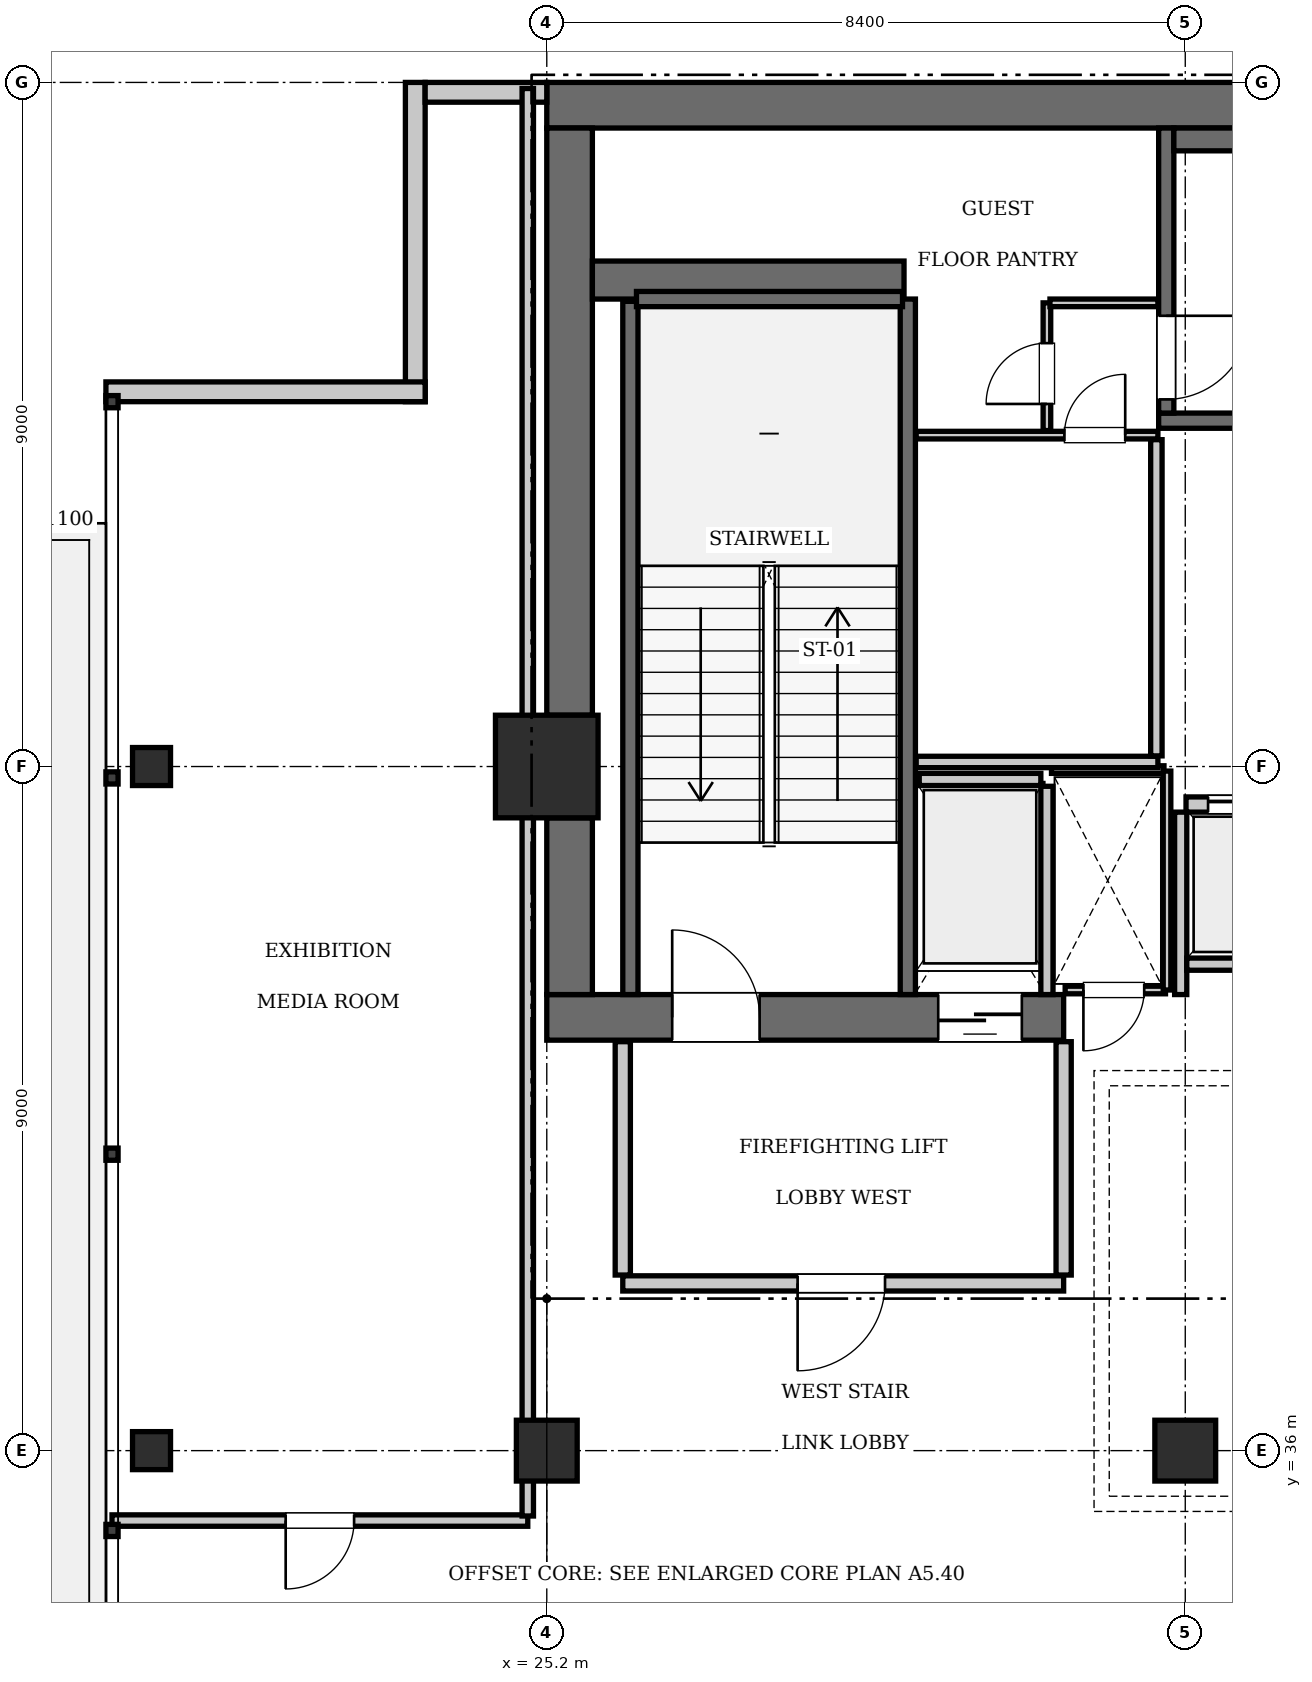
"""IFC4 building model, lengths in metres.
Left out: names, types, materials, properties, quantities, classifications, styles, units other than length and angle.
Written with IfcOpenShell. Run it as: python <this file> out.ifc"""

import sys

from ifc_helpers import new_model, si_unit, direction, frame, frame_2d, origin, origin_2d, place, context, subcontext, project, spatial, rectangle, i_section, extrude, element, fill, save


model = new_model("IFC4")
c1 = context("Model", 3, precision=1e-05, world=origin(), true_north=direction((0.0, 1.0)))
c2 = subcontext(c1, "Body", "Model", "MODEL_VIEW")
j1 = project(units=[si_unit("LENGTHUNIT", "METRE"), si_unit("PLANEANGLEUNIT", "RADIAN")], contexts=[c1])
p1 = place(None, origin())
s1 = spatial("IfcSite", under=j1, at=p1, CompositionType="ELEMENT")
p2 = place(p1, origin())
s2 = spatial("IfcBuilding", under=s1, at=p2, CompositionType="ELEMENT")
p3 = place(p2, frame((0.0, 0.0, 354.2)))
s3 = spatial("IfcBuildingStorey", under=s2, at=p3, CompositionType="ELEMENT", Elevation=354.2)
p4 = place(p3, frame((25.2, 45.0, 0.0), z_axis=(0.0, 0.0, 1.0), x_axis=(1.0, 0.0, 0.0)))
e1 = element("IfcColumn", 1, at=p4, inside=s3, PredefinedType="COLUMN", context=c2, shape_type="SweptSolid", body=[
    extrude(rectangle(XDim=1.35, YDim=1.35, at=origin_2d()), origin(), (0.0, 0.0, 1.0), 4.9),
])
p5 = place(p3, frame((25.2, 53.7, 0.0), z_axis=(0.0, 0.0, 1.0), x_axis=(1.0, 0.0, 0.0)))
e2 = element("IfcWall", 2, at=p5, inside=s3, PredefinedType="SHEAR", context=c2, shape_type="SweptSolid", body=[
    extrude(rectangle(XDim=25.2, YDim=0.6, at=frame_2d((12.6, 0.0))), origin(), (0.0, 0.0, 1.0), 4.9),
])
p6 = place(p3, frame((25.2, 41.7, 0.0), z_axis=(0.0, 0.0, 1.0), x_axis=(1.0, 0.0, 0.0)))
e3 = element("IfcWall", 3, at=p6, inside=s3, PredefinedType="SHEAR", context=c2, shape_type="SweptSolid", body=[
    extrude(rectangle(XDim=6.8, YDim=0.6, at=frame_2d((3.4, 0.0))), origin(), (0.0, 0.0, 1.0), 4.9),
])
p7 = place(p6, frame((1.65, 0.0, 0.0)))
e4 = element("IfcOpeningElement", 4, at=p7, cuts=e3, PredefinedType="OPENING", context=c2, shape_type="SweptSolid", body=[
    extrude(rectangle(XDim=1.15, YDim=2.15, at=frame_2d((0.575, 1.075))), frame((0.0, 0.31, 0.0), z_axis=(0.0, -1.0, 0.0), x_axis=(1.0, 0.0, 0.0)), (0.0, 0.0, 1.0), 0.62),
])
p8 = place(p6, frame((5.15, 0.0, 0.0)))
e5 = element("IfcOpeningElement", 5, at=p8, cuts=e3, PredefinedType="OPENING", context=c2, shape_type="SweptSolid", body=[
    extrude(rectangle(XDim=1.1, YDim=2.2, at=frame_2d((0.55, 1.1))), frame((0.0, 0.31, 0.0), z_axis=(0.0, -1.0, 0.0), x_axis=(1.0, 0.0, 0.0)), (0.0, 0.0, 1.0), 0.62),
])
p9 = place(p3, frame((25.5, 42.0, 0.0), z_axis=(0.0, 0.0, 1.0), x_axis=(0.0, 1.0, 0.0)))
e6 = element("IfcWall", 6, at=p9, inside=s3, PredefinedType="SHEAR", context=c2, shape_type="SweptSolid", body=[
    extrude(rectangle(XDim=2.325, YDim=0.6, at=frame_2d((1.163, 0.0))), origin(), (0.0, 0.0, 1.0), 4.9),
])
p10 = place(p3, frame((25.5, 45.675, 0.0), z_axis=(0.0, 0.0, 1.0), x_axis=(0.0, 1.0, 0.0)))
e7 = element("IfcWall", 7, at=p10, inside=s3, PredefinedType="SHEAR", context=c2, shape_type="SweptSolid", body=[
    extrude(rectangle(XDim=7.725, YDim=0.6, at=frame_2d((3.862, 0.0))), origin(), (0.0, 0.0, 1.0), 4.9),
])
p11 = place(p3, frame((25.8, 51.4, 0.0), z_axis=(0.0, 0.0, 1.0), x_axis=(1.0, 0.0, 0.0)))
e8 = element("IfcWall", 8, at=p11, inside=s3, PredefinedType="SHEAR", context=c2, shape_type="SweptSolid", body=[
    extrude(rectangle(XDim=4.1, YDim=0.5, at=frame_2d((2.05, 0.0))), origin(), (0.0, 0.0, 1.0), 4.9),
])
for number, where, z_axis, x_axis in (
    (9, (25.2, 36.0, 0.0), (0.0, 0.0, 1.0), (1.0, 0.0, 0.0)),
    (10, (33.6, 36.0, 0.0), (0.0, 0.0, 1.0), (1.0, 0.0, 0.0)),
):
    element("IfcColumn", number, at=place(p3, frame(where, z_axis=z_axis, x_axis=x_axis)), inside=s3, PredefinedType="COLUMN", context=c2, shape_type="SweptSolid", body=[
        extrude(rectangle(XDim=0.8, YDim=0.8, at=origin_2d()), origin(), (0.0, 0.0, 1.0), 4.9),
    ])
for number, where, z_axis, x_axis in (
    (11, (20.0, 36.0, -0.26), (0.0, 0.0, 1.0), (1.0, 0.0, 0.0)),
    (12, (20.0, 45.0, -0.26), (0.0, 0.0, 1.0), (1.0, 0.0, 0.0)),
):
    element("IfcColumn", number, at=place(p3, frame(where, z_axis=z_axis, x_axis=x_axis)), inside=s3, PredefinedType="COLUMN", context=c2, shape_type="SweptSolid", body=[
        extrude(i_section(OverallWidth=0.5, OverallDepth=0.5, WebThickness=0.022, FlangeThickness=0.032, at=origin_2d()), origin(), (0.0, 0.0, 1.0), 5.16),
    ])
p12 = place(p3, frame((29.95, 42.0, 0.0), z_axis=(0.0, 0.0, 1.0), x_axis=(0.0, 1.0, 0.0)))
e13 = element("IfcWall", 13, at=p12, inside=s3, PredefinedType="SOLIDWALL", context=c2, shape_type="SweptSolid", body=[
    extrude(rectangle(XDim=9.15, YDim=0.2, at=frame_2d((4.575, 0.0))), origin(), (0.0, 0.0, 1.0), 4.64),
])
p13 = place(p3, frame((26.3, 42.0, 0.0), z_axis=(0.0, 0.0, 1.0), x_axis=(0.0, 1.0, 0.0)))
e14 = element("IfcWall", 14, at=p13, inside=s3, PredefinedType="SOLIDWALL", context=c2, shape_type="SweptSolid", body=[
    extrude(rectangle(XDim=9.12, YDim=0.2, at=frame_2d((4.56, 0.0))), origin(), (0.0, 0.0, 1.0), 4.64),
])
p14 = place(p3, frame((26.38, 51.15, 0.0), z_axis=(0.0, 0.0, 1.0), x_axis=(1.0, 0.0, 0.0)))
e15 = element("IfcWall", 15, at=p14, inside=s3, PredefinedType="SOLIDWALL", context=c2, shape_type="SweptSolid", body=[
    extrude(rectangle(XDim=3.5, YDim=0.2, at=frame_2d((1.75, 0.0))), origin(), (0.0, 0.0, 1.0), 4.64),
])
p15 = place(p3, frame((33.25, 49.55, 0.0), z_axis=(0.0, 0.0, 1.0), x_axis=(1.0, 0.0, 0.0)))
e16 = element("IfcWall", 16, at=p15, inside=s3, PredefinedType="SOLIDWALL", context=c2, shape_type="SweptSolid", body=[
    extrude(rectangle(XDim=9.1, YDim=0.2, at=frame_2d((4.55, 0.0))), origin(), (0.0, 0.0, 1.0), 4.64),
])
p16 = place(p3, frame((33.35, 49.65, 0.0), z_axis=(0.0, 0.0, 1.0), x_axis=(0.0, 1.0, 0.0)))
e17 = element("IfcWall", 17, at=p16, inside=s3, PredefinedType="SOLIDWALL", context=c2, shape_type="SweptSolid", body=[
    extrude(rectangle(XDim=3.75, YDim=0.2, at=frame_2d((1.875, 0.0))), origin(), (0.0, 0.0, 1.0), 4.64),
])
p17 = place(p16, frame((0.18, 0.0, 0.0)))
e18 = element("IfcOpeningElement", 18, at=p17, cuts=e17, PredefinedType="OPENING", context=c2, shape_type="SweptSolid", body=[
    extrude(rectangle(XDim=1.1, YDim=2.15, at=frame_2d((0.55, 1.075))), frame((0.0, 0.11, 0.0), z_axis=(0.0, -1.0, 0.0), x_axis=(1.0, 0.0, 0.0)), (0.0, 0.0, 1.0), 0.22),
])
p18 = place(p3, frame((33.45, 53.25, 0.0), z_axis=(0.0, 0.0, 1.0), x_axis=(1.0, 0.0, 0.0)))
e19 = element("IfcWall", 19, at=p18, inside=s3, PredefinedType="SOLIDWALL", context=c2, shape_type="SweptSolid", body=[
    extrude(rectangle(XDim=8.7, YDim=0.3, at=frame_2d((4.35, 0.0))), origin(), (0.0, 0.0, 1.0), 4.64),
])
p19 = place(p3, frame((33.61, 44.5, 0.0), z_axis=(0.0, 0.0, 1.0), x_axis=(1.0, 0.0, 0.0)))
e20 = element("IfcWall", 20, at=p19, inside=s3, PredefinedType="SOLIDWALL", context=c2, shape_type="SweptSolid", body=[
    extrude(rectangle(XDim=1.68, YDim=0.2, at=frame_2d((0.84, 0.0))), origin(), (0.0, 0.0, 1.0), 4.64),
])
p20 = place(p19, frame((0.29, 0.0, 0.0)))
e21 = element("IfcOpeningElement", 21, at=p20, cuts=e20, PredefinedType="OPENING", context=c2, shape_type="SweptSolid", body=[
    extrude(rectangle(XDim=1.1, YDim=2.2, at=frame_2d((0.55, 1.1))), frame((0.0, 0.11, 0.0), z_axis=(0.0, -1.0, 0.0), x_axis=(1.0, 0.0, 0.0)), (0.0, 0.0, 1.0), 0.22),
])
p21 = place(p3, frame((30.1, 44.83, 0.0), z_axis=(0.0, 0.0, 1.0), x_axis=(1.0, 0.0, 0.0)))
e22 = element("IfcWall", 22, at=p21, inside=s3, PredefinedType="SOLIDWALL", context=c2, shape_type="SweptSolid", body=[
    extrude(rectangle(XDim=1.6, YDim=0.16, at=frame_2d((0.8, 0.0))), origin(), (0.0, 0.0, 1.0), 4.64),
])
p22 = place(p3, frame((31.78, 42.0, 0.0), z_axis=(0.0, 0.0, 1.0), x_axis=(0.0, 1.0, 0.0)))
e23 = element("IfcWall", 23, at=p22, inside=s3, PredefinedType="SOLIDWALL", context=c2, shape_type="SweptSolid", body=[
    extrude(rectangle(XDim=2.74, YDim=0.16, at=frame_2d((1.37, 0.0))), origin(), (0.0, 0.0, 1.0), 4.64),
])
p23 = place(p3, frame((33.54, 42.0, 0.0), z_axis=(0.0, 0.0, 1.0), x_axis=(0.0, 1.0, 0.0)))
e24 = element("IfcWall", 24, at=p23, inside=s3, PredefinedType="SOLIDWALL", context=c2, shape_type="SweptSolid", body=[
    extrude(rectangle(XDim=2.4, YDim=0.16, at=frame_2d((1.2, 0.0))), origin(), (0.0, 0.0, 1.0), 4.64),
])
p24 = place(p3, frame((33.62, 42.4, 0.0), z_axis=(0.0, 0.0, 1.0), x_axis=(1.0, 0.0, 0.0)))
e25 = element("IfcWall", 25, at=p24, inside=s3, PredefinedType="SOLIDWALL", context=c2, shape_type="SweptSolid", body=[
    extrude(rectangle(XDim=1.66, YDim=0.16, at=frame_2d((0.83, 0.0))), origin(), (0.0, 0.0, 1.0), 4.64),
])
p25 = place(p3, frame((23.47, 49.8, 0.0), z_axis=(0.0, 0.0, 1.0), x_axis=(0.0, 1.0, 0.0)))
e26 = element("IfcWall", 26, at=p25, inside=s3, PredefinedType="SOLIDWALL", context=c2, shape_type="SweptSolid", body=[
    extrude(rectangle(XDim=4.2, YDim=0.26, at=frame_2d((2.1, 0.0))), origin(), (0.0, 0.0, 1.0), 4.64),
])
p26 = place(p3, frame((19.4, 49.93, 0.0), z_axis=(0.0, 0.0, 1.0), x_axis=(1.0, 0.0, 0.0)))
e27 = element("IfcWall", 27, at=p26, inside=s3, PredefinedType="SOLIDWALL", context=c2, shape_type="SweptSolid", body=[
    extrude(rectangle(XDim=4.2, YDim=0.26, at=frame_2d((2.1, 0.0))), origin(), (0.0, 0.0, 1.0), 4.64),
])
p27 = place(p3, frame((25.2, 53.87, 0.0), z_axis=(0.0, 0.0, 1.0), x_axis=(-1.0, 0.0, 0.0)))
e28 = element("IfcWall", 28, at=p27, inside=s3, PredefinedType="SOLIDWALL", context=c2, shape_type="SweptSolid", body=[
    extrude(rectangle(XDim=1.6, YDim=0.26, at=frame_2d((0.8, 0.0))), origin(), (0.0, 0.0, 1.0), 4.64),
])
p28 = place(p3, frame((26.2, 38.2, 0.0), z_axis=(0.0, 0.0, 1.0), x_axis=(1.0, 0.0, 0.0)))
e29 = element("IfcWall", 29, at=p28, inside=s3, PredefinedType="PARTITIONING", context=c2, shape_type="SweptSolid", body=[
    extrude(rectangle(XDim=5.8, YDim=0.2, at=frame_2d((2.9, 0.0))), origin(), (0.0, 0.0, 1.0), 4.64),
])
p29 = place(p28, frame((2.3, 0.0, 0.0)))
e30 = element("IfcOpeningElement", 30, at=p29, cuts=e29, PredefinedType="OPENING", context=c2, shape_type="SweptSolid", body=[
    extrude(rectangle(XDim=1.15, YDim=2.15, at=frame_2d((0.575, 1.075))), frame((0.0, 0.11, 0.0), z_axis=(0.0, -1.0, 0.0), x_axis=(1.0, 0.0, 0.0)), (0.0, 0.0, 1.0), 0.22),
])
for number, where, z_axis, x_axis in (
    (31, (26.2, 38.31, 0.0), (0.0, 0.0, 1.0), (0.0, 1.0, 0.0)),
    (32, (32.0, 38.31, 0.0), (0.0, 0.0, 1.0), (0.0, 1.0, 0.0)),
):
    element("IfcWall", number, at=place(p3, frame(where, z_axis=z_axis, x_axis=x_axis)), inside=s3, PredefinedType="PARTITIONING", context=c2, shape_type="SweptSolid", body=[
        extrude(rectangle(XDim=3.07, YDim=0.2, at=frame_2d((1.535, 0.0))), origin(), (0.0, 0.0, 1.0), 4.64),
    ])
p30 = place(p3, frame((32.02, 42.06, 0.0), z_axis=(0.0, 0.0, 1.0), x_axis=(1.0, 0.0, 0.0)))
e33 = element("IfcWall", 33, at=p30, inside=s3, PredefinedType="PARTITIONING", context=c2, shape_type="SweptSolid", body=[
    extrude(rectangle(XDim=1.32, YDim=0.1, at=frame_2d((0.66, 0.0))), origin(), (0.0, 0.0, 1.0), 4.64),
])
p31 = place(p30, frame((0.24, 0.0, 0.0)))
e34 = element("IfcOpeningElement", 34, at=p31, cuts=e33, PredefinedType="OPENING", context=c2, shape_type="SweptSolid", body=[
    extrude(rectangle(XDim=0.8, YDim=2.05, at=frame_2d((0.4, 1.025))), frame((0.0, 0.06, 0.0), z_axis=(0.0, -1.0, 0.0), x_axis=(1.0, 0.0, 0.0)), (0.0, 0.0, 1.0), 0.12),
])
p32 = place(p3, frame((31.84, 44.96, 0.0), z_axis=(0.0, 0.0, 1.0), x_axis=(1.0, 0.0, 0.0)))
e35 = element("IfcWall", 35, at=p32, inside=s3, PredefinedType="PARTITIONING", context=c2, shape_type="SweptSolid", body=[
    extrude(rectangle(XDim=1.48, YDim=0.1, at=frame_2d((0.74, 0.0))), origin(), (0.0, 0.0, 1.0), 4.64),
])
p33 = place(p3, frame((33.36, 42.06, 0.0), z_axis=(0.0, 0.0, 1.0), x_axis=(0.0, 1.0, 0.0)))
e36 = element("IfcWall", 36, at=p33, inside=s3, PredefinedType="PARTITIONING", context=c2, shape_type="SweptSolid", body=[
    extrude(rectangle(XDim=2.88, YDim=0.1, at=frame_2d((1.44, 0.0))), origin(), (0.0, 0.0, 1.0), 4.64),
])
p34 = place(p3, frame((30.06, 45.06, 0.0), z_axis=(0.0, 0.0, 1.0), x_axis=(1.0, 0.0, 0.0)))
e37 = element("IfcWall", 37, at=p34, inside=s3, PredefinedType="PARTITIONING", context=c2, shape_type="SweptSolid", body=[
    extrude(rectangle(XDim=3.18, YDim=0.15, at=frame_2d((1.59, 0.0))), origin(), (0.0, 0.0, 1.0), 4.64),
])
p35 = place(p3, frame((33.22, 45.14, 0.0), z_axis=(0.0, 0.0, 1.0), x_axis=(0.0, 1.0, 0.0)))
e38 = element("IfcWall", 38, at=p35, inside=s3, PredefinedType="PARTITIONING", context=c2, shape_type="SweptSolid", body=[
    extrude(rectangle(XDim=4.16, YDim=0.15, at=frame_2d((2.08, 0.0))), origin(), (0.0, 0.0, 1.0), 4.64),
])
p36 = place(p3, frame((30.06, 49.36, 0.0), z_axis=(0.0, 0.0, 1.0), x_axis=(1.0, 0.0, 0.0)))
e39 = element("IfcWall", 39, at=p36, inside=s3, PredefinedType="PARTITIONING", context=c2, shape_type="SweptSolid", body=[
    extrude(rectangle(XDim=3.18, YDim=0.1, at=frame_2d((1.59, 0.0))), origin(), (0.0, 0.0, 1.0), 4.64),
])
p37 = place(p36, frame((1.95, 0.0, 0.0)))
e40 = element("IfcOpeningElement", 40, at=p37, cuts=e39, PredefinedType="OPENING", context=c2, shape_type="SweptSolid", body=[
    extrude(rectangle(XDim=0.8, YDim=2.05, at=frame_2d((0.4, 1.025))), frame((0.0, 0.06, 0.0), z_axis=(0.0, -1.0, 0.0), x_axis=(1.0, 0.0, 0.0)), (0.0, 0.0, 1.0), 0.12),
])
p38 = place(p3, frame((31.78, 49.42, 0.0), z_axis=(0.0, 0.0, 1.0), x_axis=(0.0, 1.0, 0.0)))
e41 = element("IfcWall", 41, at=p38, inside=s3, PredefinedType="PARTITIONING", context=c2, shape_type="SweptSolid", body=[
    extrude(rectangle(XDim=1.68, YDim=0.1, at=frame_2d((0.84, 0.0))), origin(), (0.0, 0.0, 1.0), 4.64),
])
p39 = place(p38, frame((0.35, 0.0, 0.0)))
e42 = element("IfcOpeningElement", 42, at=p39, cuts=e41, PredefinedType="OPENING", context=c2, shape_type="SweptSolid", body=[
    extrude(rectangle(XDim=0.8, YDim=2.05, at=frame_2d((0.4, 1.025))), frame((0.0, 0.06, 0.0), z_axis=(0.0, -1.0, 0.0), x_axis=(1.0, 0.0, 0.0)), (0.0, 0.0, 1.0), 0.12),
])
p40 = place(p3, frame((31.82, 51.1, 0.0), z_axis=(0.0, 0.0, 1.0), x_axis=(1.0, 0.0, 0.0)))
e43 = element("IfcWall", 43, at=p40, inside=s3, PredefinedType="PARTITIONING", context=c2, shape_type="SweptSolid", body=[
    extrude(rectangle(XDim=1.42, YDim=0.1, at=frame_2d((0.71, 0.0))), origin(), (0.0, 0.0, 1.0), 4.64),
])
p41 = place(p3, frame((19.48, 35.08, 0.0), z_axis=(0.0, 0.0, 1.0), x_axis=(1.0, 0.0, 0.0)))
e44 = element("IfcWall", 44, at=p41, inside=s3, PredefinedType="PARTITIONING", context=c2, shape_type="SweptSolid", body=[
    extrude(rectangle(XDim=5.47, YDim=0.15, at=frame_2d((2.735, 0.0))), origin(), (0.0, 0.0, 1.0), 4.64),
])
p42 = place(p41, frame((2.285, 0.0, 0.0)))
e45 = element("IfcOpeningElement", 45, at=p42, cuts=e44, PredefinedType="OPENING", context=c2, shape_type="SweptSolid", body=[
    extrude(rectangle(XDim=0.9, YDim=2.1, at=frame_2d((0.45, 1.05))), frame((0.0, 0.085, 0.0), z_axis=(0.0, -1.0, 0.0), x_axis=(1.0, 0.0, 0.0)), (0.0, 0.0, 1.0), 0.17),
])
p43 = place(p3, frame((24.95, 35.14, 0.0), z_axis=(0.0, 0.0, 1.0), x_axis=(0.0, 1.0, 0.0)))
e46 = element("IfcWall", 46, at=p43, inside=s3, PredefinedType="PARTITIONING", context=c2, shape_type="SweptSolid", body=[
    extrude(rectangle(XDim=18.78, YDim=0.15, at=frame_2d((9.39, 0.0))), origin(), (0.0, 0.0, 1.0), 4.64),
])
p44 = place(p7, origin())
e47 = element("IfcDoor", 47, at=p44, inside=s3, OperationType="SINGLE_SWING_LEFT", PredefinedType="DOOR", context=c2, shape_type="SweptSolid", body=[
    extrude(rectangle(XDim=1.15, YDim=2.15, at=frame_2d((0.575, 1.075))), frame((0.0, 0.025, 0.0), z_axis=(0.0, -1.0, 0.0), x_axis=(1.0, 0.0, 0.0)), (0.0, 0.0, 1.0), 0.05),
])
fill(e4, e47)
p45 = place(p17, frame((1.1, 0.0, 0.0), z_axis=(0.0, 0.0, 1.0), x_axis=(-1.0, 0.0, 0.0)))
e48 = element("IfcDoor", 48, at=p45, inside=s3, OperationType="SINGLE_SWING_LEFT", PredefinedType="DOOR", context=c2, shape_type="SweptSolid", body=[
    extrude(rectangle(XDim=1.1, YDim=2.15, at=frame_2d((0.55, 1.075))), frame((0.0, 0.025, 0.0), z_axis=(0.0, -1.0, 0.0), x_axis=(1.0, 0.0, 0.0)), (0.0, 0.0, 1.0), 0.05),
])
fill(e18, e48)
p46 = place(p20, origin())
e49 = element("IfcDoor", 49, at=p46, inside=s3, OperationType="SLIDING_TO_RIGHT", PredefinedType="DOOR", context=c2, shape_type="SweptSolid", body=[
    extrude(rectangle(XDim=1.1, YDim=2.2, at=frame_2d((0.55, 1.1))), frame((0.0, 0.025, 0.0), z_axis=(0.0, -1.0, 0.0), x_axis=(1.0, 0.0, 0.0)), (0.0, 0.0, 1.0), 0.05),
])
fill(e21, e49)
p47 = place(p8, frame((1.1, 0.0, 0.0), z_axis=(0.0, 0.0, 1.0), x_axis=(-1.0, 0.0, 0.0)))
e50 = element("IfcDoor", 50, at=p47, inside=s3, OperationType="SLIDING_TO_LEFT", PredefinedType="DOOR", context=c2, shape_type="SweptSolid", body=[
    extrude(rectangle(XDim=1.1, YDim=2.2, at=frame_2d((0.55, 1.1))), frame((0.0, 0.025, 0.0), z_axis=(0.0, -1.0, 0.0), x_axis=(1.0, 0.0, 0.0)), (0.0, 0.0, 1.0), 0.05),
])
fill(e5, e50)
p48 = place(p29, frame((1.15, 0.0, 0.0), z_axis=(0.0, 0.0, 1.0), x_axis=(-1.0, 0.0, 0.0)))
e51 = element("IfcDoor", 51, at=p48, inside=s3, OperationType="SINGLE_SWING_RIGHT", PredefinedType="DOOR", context=c2, shape_type="SweptSolid", body=[
    extrude(rectangle(XDim=1.15, YDim=2.15, at=frame_2d((0.575, 1.075))), frame((0.0, 0.025, 0.0), z_axis=(0.0, -1.0, 0.0), x_axis=(1.0, 0.0, 0.0)), (0.0, 0.0, 1.0), 0.05),
])
fill(e30, e51)
p49 = place(p31, frame((0.8, 0.0, 0.0), z_axis=(0.0, 0.0, 1.0), x_axis=(-1.0, 0.0, 0.0)))
e52 = element("IfcDoor", 52, at=p49, inside=s3, OperationType="SINGLE_SWING_RIGHT", PredefinedType="DOOR", context=c2, shape_type="SweptSolid", body=[
    extrude(rectangle(XDim=0.8, YDim=2.05, at=frame_2d((0.4, 1.025))), frame((0.0, 0.025, 0.0), z_axis=(0.0, -1.0, 0.0), x_axis=(1.0, 0.0, 0.0)), (0.0, 0.0, 1.0), 0.05),
])
fill(e34, e52)
p50 = place(p37, origin())
e53 = element("IfcDoor", 53, at=p50, inside=s3, OperationType="SINGLE_SWING_RIGHT", PredefinedType="DOOR", context=c2, shape_type="SweptSolid", body=[
    extrude(rectangle(XDim=0.8, YDim=2.05, at=frame_2d((0.4, 1.025))), frame((0.0, 0.025, 0.0), z_axis=(0.0, -1.0, 0.0), x_axis=(1.0, 0.0, 0.0)), (0.0, 0.0, 1.0), 0.05),
])
fill(e40, e53)
p51 = place(p39, origin())
e54 = element("IfcDoor", 54, at=p51, inside=s3, OperationType="SINGLE_SWING_LEFT", PredefinedType="DOOR", context=c2, shape_type="SweptSolid", body=[
    extrude(rectangle(XDim=0.8, YDim=2.05, at=frame_2d((0.4, 1.025))), frame((0.0, 0.025, 0.0), z_axis=(0.0, -1.0, 0.0), x_axis=(1.0, 0.0, 0.0)), (0.0, 0.0, 1.0), 0.05),
])
fill(e42, e54)
p52 = place(p42, frame((0.9, 0.0, 0.0), z_axis=(0.0, 0.0, 1.0), x_axis=(-1.0, 0.0, 0.0)))
e55 = element("IfcDoor", 55, at=p52, inside=s3, OperationType="SINGLE_SWING_RIGHT", PredefinedType="DOOR", context=c2, shape_type="SweptSolid", body=[
    extrude(rectangle(XDim=0.9, YDim=2.1, at=frame_2d((0.45, 1.05))), frame((0.0, 0.025, 0.0), z_axis=(0.0, -1.0, 0.0), x_axis=(1.0, 0.0, 0.0)), (0.0, 0.0, 1.0), 0.05),
])
fill(e45, e55)
save(model, sys.argv[1])
